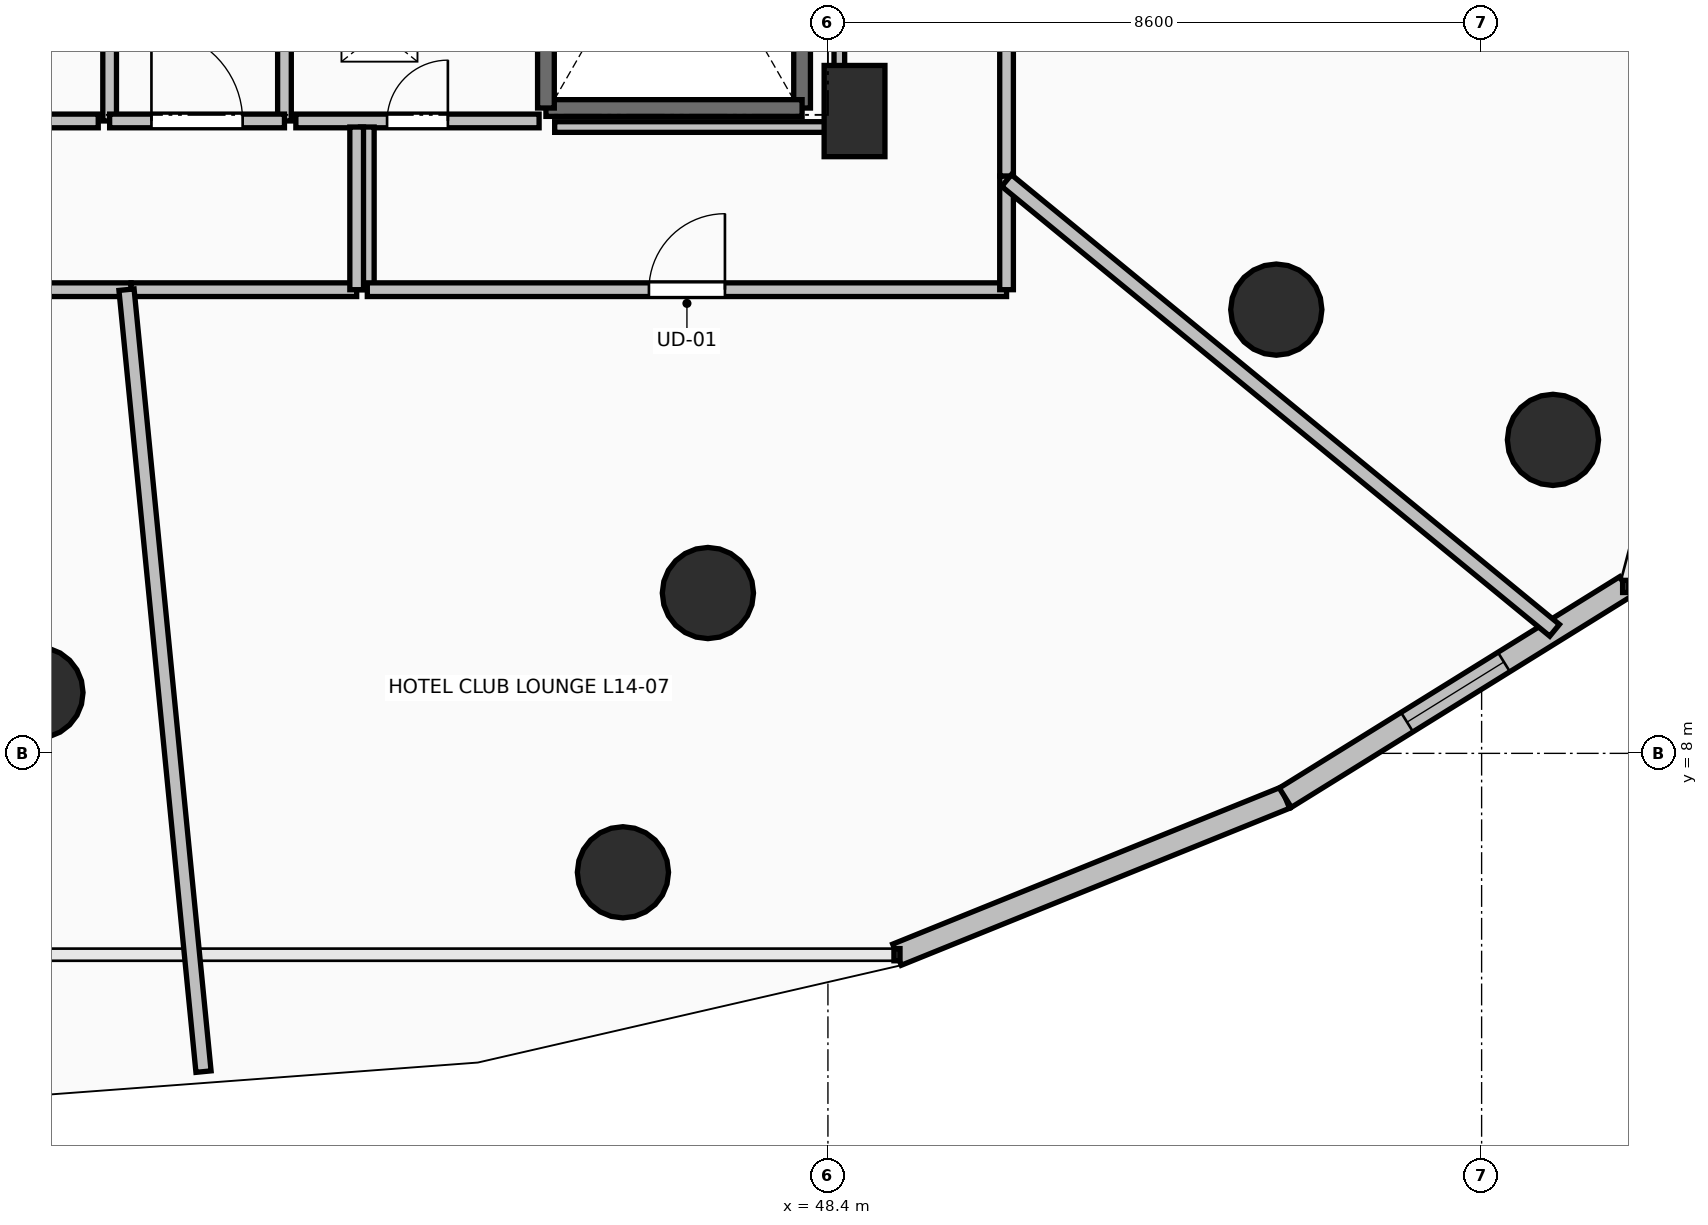
"""IFC4 building model, lengths in metres.
Left out: names, types, materials, properties, quantities, classifications, styles, units other than length and angle.
Written with IfcOpenShell. Run it as: python <this file> out.ifc"""

import sys

from ifc_helpers import new_model, si_unit, direction, frame, frame_2d, origin, origin_2d, place, context, subcontext, project, spatial, rectangle, circle, extrude, element, fill, save


model = new_model("IFC4")
c1 = context("Model", 3, precision=1e-05, world=origin(), true_north=direction((0.0, 1.0)))
c2 = subcontext(c1, "Body", "Model", "MODEL_VIEW")
j1 = project(units=[si_unit("LENGTHUNIT", "METRE"), si_unit("PLANEANGLEUNIT", "RADIAN")], contexts=[c1])
p1 = place(None, origin())
s1 = spatial("IfcSite", under=j1, at=p1, CompositionType="ELEMENT")
p2 = place(p1, origin())
s2 = spatial("IfcBuilding", under=s1, at=p2, CompositionType="ELEMENT")
p3 = place(p2, frame((0.0, 0.0, 55.5)))
s3 = spatial("IfcBuildingStorey", under=s2, at=p3, CompositionType="ELEMENT", Elevation=55.5)
for number, where, z_axis, x_axis in (
    (1, (38.0, 8.8, 0.0), (0.0, 0.0, 1.0), (0.0, -1.0, 0.0)),
    (2, (46.821, 10.109, 0.0), (0.0, 0.0, 1.0), (0.383, -0.924, 0.0)),
    (3, (54.299, 13.838, 0.0), (0.0, 0.0, 1.0), (0.707, -0.707, 0.0)),
    (4, (45.703, 6.435, 0.0), (0.0, 0.0, 1.0), (0.383, -0.924, 0.0)),
    (5, (57.939, 12.124, 0.0), (0.0, 0.0, 1.0), (0.707, -0.707, 0.0)),
):
    element("IfcColumn", number, at=place(p3, frame(where, z_axis=z_axis, x_axis=x_axis)), inside=s3, PredefinedType="COLUMN", context=c2, shape_type="SweptSolid", body=[
        extrude(circle(Radius=0.6, at=origin_2d()), origin(), (0.0, 0.0, 1.0), 3.5),
    ])
p4 = place(p3, frame((48.75, 16.45, 0.0), z_axis=(0.0, 0.0, 1.0), x_axis=(1.0, 0.0, 0.0)))
e6 = element("IfcColumn", 6, at=p4, inside=s3, PredefinedType="PILASTER", context=c2, shape_type="SweptSolid", body=[
    extrude(rectangle(XDim=0.8, YDim=1.2, at=origin_2d()), origin(), (0.0, 0.0, 1.0), 3.5),
])
p5 = place(p3, frame((49.308, 5.351, 0.0), z_axis=(0.0, 0.0, 1.0), x_axis=(0.927095325176, 0.374825636845, 0.0)))
e7 = element("IfcWall", 7, at=p5, inside=s3, PredefinedType="STANDARD", context=c2, shape_type="SweptSolid", body=[
    extrude(rectangle(XDim=5.51, YDim=0.3, at=frame_2d((2.755, 0.0))), origin(), (0.0, 0.0, 1.0), 3.24),
])
p6 = place(p3, frame((54.417, 7.417, 0.0), z_axis=(0.0, 0.0, 1.0), x_axis=(0.849633724826, 0.527373239404, 0.0)))
e8 = element("IfcWall", 8, at=p6, inside=s3, PredefinedType="STANDARD", context=c2, shape_type="SweptSolid", body=[
    extrude(rectangle(XDim=5.271, YDim=0.3, at=frame_2d((2.635, 0.0))), origin(), (0.0, 0.0, 1.0), 3.24),
])
p7 = place(p6, frame((1.885, 0.0, 0.85)))
e9 = element("IfcOpeningElement", 9, at=p7, cuts=e8, PredefinedType="OPENING", context=c2, shape_type="SweptSolid", body=[
    extrude(rectangle(XDim=1.5, YDim=2.19, at=frame_2d((0.75, 1.095))), frame((0.0, 0.165, 0.0), z_axis=(0.0, -1.0, 0.0), x_axis=(1.0, 0.0, 0.0)), (0.0, 0.0, 1.0), 0.33),
])
p8 = place(p3, frame((48.06, 23.91, 0.0), z_axis=(0.0, 0.0, 1.0), x_axis=(0.0, -1.0, 0.0)))
e10 = element("IfcWall", 10, at=p8, inside=s3, PredefinedType="SOLIDWALL", context=c2, shape_type="SweptSolid", body=[
    extrude(rectangle(XDim=7.42, YDim=0.22, at=frame_2d((3.71, 0.0))), origin(), (0.0, 0.0, 1.0), 3.24),
])
p9 = place(p3, frame((48.06, 16.49, 0.0), z_axis=(0.0, 0.0, 1.0), x_axis=(-1.0, 0.0, 0.0)))
e11 = element("IfcWall", 11, at=p9, inside=s3, PredefinedType="SOLIDWALL", context=c2, shape_type="SweptSolid", body=[
    extrude(rectangle(XDim=3.37, YDim=0.22, at=frame_2d((1.685, 0.0))), origin(), (0.0, 0.0, 1.0), 3.24),
])
p10 = place(p3, frame((44.69, 16.49, 0.0), z_axis=(0.0, 0.0, 1.0), x_axis=(0.0, 1.0, 0.0)))
e12 = element("IfcWall", 12, at=p10, inside=s3, PredefinedType="SOLIDWALL", context=c2, shape_type="SweptSolid", body=[
    extrude(rectangle(XDim=7.42, YDim=0.22, at=frame_2d((3.71, 0.0))), origin(), (0.0, 0.0, 1.0), 3.24),
])
p11 = place(p3, frame((41.25, 16.32, 0.0), z_axis=(0.0, 0.0, 1.0), x_axis=(0.0, 1.0, 0.0)))
e13 = element("IfcWall", 13, at=p11, inside=s3, PredefinedType="PARTITIONING", context=c2, shape_type="SweptSolid", body=[
    extrude(rectangle(XDim=7.88, YDim=0.18, at=frame_2d((3.94, 0.0))), origin(), (0.0, 0.0, 1.0), 3.24),
])
p12 = place(p11, frame((3.54, 0.0, 0.0)))
e14 = element("IfcOpeningElement", 14, at=p12, cuts=e13, PredefinedType="OPENING", context=c2, shape_type="SweptSolid", body=[
    extrude(rectangle(XDim=0.8, YDim=2.05, at=frame_2d((0.4, 1.025))), frame((0.0, 0.105, 0.0), z_axis=(0.0, -1.0, 0.0), x_axis=(1.0, 0.0, 0.0)), (0.0, 0.0, 1.0), 0.21),
])
p13 = place(p3, frame((38.95, 21.755, 0.0), z_axis=(0.0, 0.0, 1.0), x_axis=(0.0, -1.0, 0.0)))
e15 = element("IfcWall", 15, at=p13, inside=s3, PredefinedType="PARTITIONING", context=c2, shape_type="SweptSolid", body=[
    extrude(rectangle(XDim=5.435, YDim=0.18, at=frame_2d((2.717, 0.0))), origin(), (0.0, 0.0, 1.0), 3.24),
])
p14 = place(p13, frame((2.292, 0.0, 0.0)))
e16 = element("IfcOpeningElement", 16, at=p14, cuts=e15, PredefinedType="OPENING", context=c2, shape_type="SweptSolid", body=[
    extrude(rectangle(XDim=0.85, YDim=2.1, at=frame_2d((0.425, 1.05))), frame((0.0, 0.105, 0.0), z_axis=(0.0, -1.0, 0.0), x_axis=(1.0, 0.0, 0.0)), (0.0, 0.0, 1.0), 0.21),
])
p15 = place(p3, frame((38.95, 16.32, 0.0), z_axis=(0.0, 0.0, 1.0), x_axis=(1.0, 0.0, 0.0)))
e17 = element("IfcWall", 17, at=p15, inside=s3, PredefinedType="PARTITIONING", context=c2, shape_type="SweptSolid", body=[
    extrude(rectangle(XDim=2.3, YDim=0.18, at=frame_2d((1.15, 0.0))), origin(), (0.0, 0.0, 1.0), 3.24),
])
p16 = place(p15, frame((0.55, 0.0, 0.0)))
e18 = element("IfcOpeningElement", 18, at=p16, cuts=e17, PredefinedType="OPENING", context=c2, shape_type="SweptSolid", body=[
    extrude(rectangle(XDim=1.2, YDim=2.15, at=frame_2d((0.6, 1.075))), frame((0.0, 0.105, 0.0), z_axis=(0.0, -1.0, 0.0), x_axis=(1.0, 0.0, 0.0)), (0.0, 0.0, 1.0), 0.21),
])
p17 = place(p3, frame((41.4, 16.32, 0.0), z_axis=(0.0, 0.0, 1.0), x_axis=(1.0, 0.0, 0.0)))
e19 = element("IfcWall", 19, at=p17, inside=s3, PredefinedType="PARTITIONING", context=c2, shape_type="SweptSolid", body=[
    extrude(rectangle(XDim=3.2, YDim=0.18, at=frame_2d((1.6, 0.0))), origin(), (0.0, 0.0, 1.0), 3.24),
])
p18 = place(p17, frame((1.2, 0.0, 0.0)))
e20 = element("IfcOpeningElement", 20, at=p18, cuts=e19, PredefinedType="OPENING", context=c2, shape_type="SweptSolid", body=[
    extrude(rectangle(XDim=0.8, YDim=2.05, at=frame_2d((0.4, 1.025))), frame((0.0, 0.105, 0.0), z_axis=(0.0, -1.0, 0.0), x_axis=(1.0, 0.0, 0.0)), (0.0, 0.0, 1.0), 0.21),
])
p19 = place(p3, frame((35.2, 16.32, 0.0), z_axis=(0.0, 0.0, 1.0), x_axis=(1.0, 0.0, 0.0)))
e21 = element("IfcWall", 21, at=p19, inside=s3, PredefinedType="PARTITIONING", context=c2, shape_type="SweptSolid", body=[
    extrude(rectangle(XDim=3.6, YDim=0.18, at=frame_2d((1.8, 0.0))), origin(), (0.0, 0.0, 1.0), 3.24),
])
p20 = place(p19, frame((1.375, 0.0, 0.0)))
e22 = element("IfcOpeningElement", 22, at=p20, cuts=e21, PredefinedType="OPENING", context=c2, shape_type="SweptSolid", body=[
    extrude(rectangle(XDim=0.85, YDim=2.1, at=frame_2d((0.425, 1.05))), frame((0.0, 0.105, 0.0), z_axis=(0.0, -1.0, 0.0), x_axis=(1.0, 0.0, 0.0)), (0.0, 0.0, 1.0), 0.21),
])
p21 = place(p3, frame((33.704, 14.1, 0.0), z_axis=(0.0, 0.0, 1.0), x_axis=(1.0, 0.0, 0.0)))
e23 = element("IfcWall", 23, at=p21, inside=s3, PredefinedType="PARTITIONING", context=c2, shape_type="SweptSolid", body=[
    extrude(rectangle(XDim=5.528, YDim=0.18, at=frame_2d((2.764, 0.0))), origin(), (0.0, 0.0, 1.0), 3.24),
])
p22 = place(p21, frame((2.239, 0.0, 0.0)))
e24 = element("IfcOpeningElement", 24, at=p22, cuts=e23, PredefinedType="OPENING", context=c2, shape_type="SweptSolid", body=[
    extrude(rectangle(XDim=1.05, YDim=2.2, at=frame_2d((0.525, 1.1))), frame((0.0, 0.105, 0.0), z_axis=(0.0, -1.0, 0.0), x_axis=(1.0, 0.0, 0.0)), (0.0, 0.0, 1.0), 0.21),
])
p23 = place(p3, frame((42.34, 16.24, 0.0), z_axis=(0.0, 0.0, 1.0), x_axis=(0.0, -1.0, 0.0)))
e25 = element("IfcWall", 25, at=p23, inside=s3, PredefinedType="PARTITIONING", context=c2, shape_type="SweptSolid", body=[
    extrude(rectangle(XDim=2.14, YDim=0.18, at=frame_2d((1.07, 0.0))), origin(), (0.0, 0.0, 1.0), 3.24),
])
p24 = place(p3, frame((42.34, 14.1, 0.0), z_axis=(0.0, 0.0, 1.0), x_axis=(1.0, 0.0, 0.0)))
e26 = element("IfcWall", 26, at=p24, inside=s3, PredefinedType="PARTITIONING", context=c2, shape_type="SweptSolid", body=[
    extrude(rectangle(XDim=8.41, YDim=0.18, at=frame_2d((4.205, 0.0))), origin(), (0.0, 0.0, 1.0), 2.432),
])
p25 = place(p24, frame((3.705, 0.0, 0.0)))
e27 = element("IfcOpeningElement", 27, at=p25, cuts=e26, PredefinedType="OPENING", context=c2, shape_type="SweptSolid", body=[
    extrude(rectangle(XDim=1.0, YDim=2.15, at=frame_2d((0.5, 1.075))), frame((0.0, 0.105, 0.0), z_axis=(0.0, -1.0, 0.0), x_axis=(1.0, 0.0, 0.0)), (0.0, 0.0, 1.0), 0.21),
])
p26 = place(p3, frame((50.75, 14.1, 0.0), z_axis=(0.0, 0.0, 1.0), x_axis=(0.0, 1.0, 0.0)))
e28 = element("IfcWall", 28, at=p26, inside=s3, PredefinedType="PARTITIONING", context=c2, shape_type="SweptSolid", body=[
    extrude(rectangle(XDim=1.496, YDim=0.18, at=frame_2d((0.748, 0.0))), origin(), (0.0, 0.0, 1.0), 2.432),
])
p27 = place(p3, frame((39.232, 14.1, 0.0), z_axis=(0.0, 0.0, 1.0), x_axis=(1.0, 0.0, 0.0)))
e29 = element("IfcWall", 29, at=p27, inside=s3, PredefinedType="PARTITIONING", context=c2, shape_type="SweptSolid", body=[
    extrude(rectangle(XDim=2.968, YDim=0.18, at=frame_2d((1.484, 0.0))), origin(), (0.0, 0.0, 1.0), 3.24),
])
p28 = place(p3, frame((42.2, 14.1, 0.0), z_axis=(0.0, 0.0, 1.0), x_axis=(0.0, 1.0, 0.0)))
e30 = element("IfcWall", 30, at=p28, inside=s3, PredefinedType="PARTITIONING", context=c2, shape_type="SweptSolid", body=[
    extrude(rectangle(XDim=2.14, YDim=0.18, at=frame_2d((1.07, 0.0))), origin(), (0.0, 0.0, 1.0), 3.24),
])
p29 = place(p3, frame((50.75, 15.596, 0.0), z_axis=(0.0, 0.0, 1.0), x_axis=(0.0, 1.0, 0.0)))
e31 = element("IfcWall", 31, at=p29, inside=s3, PredefinedType="PARTITIONING", context=c2, shape_type="SweptSolid", body=[
    extrude(rectangle(XDim=11.46, YDim=0.18, at=frame_2d((5.73, 0.0))), origin(), (0.0, 0.0, 1.0), 2.432),
])
p30 = place(p29, frame((5.23, 0.0, 0.0)))
e32 = element("IfcOpeningElement", 32, at=p30, cuts=e31, PredefinedType="OPENING", context=c2, shape_type="SweptSolid", body=[
    extrude(rectangle(XDim=1.0, YDim=2.15, at=frame_2d((0.5, 1.075))), frame((0.0, 0.105, 0.0), z_axis=(0.0, -1.0, 0.0), x_axis=(1.0, 0.0, 0.0)), (0.0, 0.0, 1.0), 0.21),
])
p31 = place(p3, frame((40.185, 3.813, 0.0), z_axis=(0.0, 0.0, 1.0), x_axis=(-0.097992958783, 0.99518710805, 0.0)))
e33 = element("IfcWall", 33, at=p31, inside=s3, PredefinedType="PARTITIONING", context=c2, shape_type="SweptSolid", body=[
    extrude(rectangle(XDim=10.337, YDim=0.2, at=frame_2d((5.168, 0.0))), origin(), (0.0, 0.0, 1.0), 2.432),
])
p32 = place(p3, frame((57.96, 9.619, 0.0), z_axis=(0.0, 0.0, 1.0), x_axis=(-0.773014125172, 0.634388810025, 0.0)))
e34 = element("IfcWall", 34, at=p32, inside=s3, PredefinedType="PARTITIONING", context=c2, shape_type="SweptSolid", body=[
    extrude(rectangle(XDim=9.327, YDim=0.2, at=frame_2d((4.664, 0.0))), origin(), (0.0, 0.0, 1.0), 2.432),
])
p33 = place(p3, frame((48.55, 23.754, 0.0), z_axis=(0.0, 0.0, 1.0), x_axis=(0.0, -1.0, 0.0)))
e35 = element("IfcWall", 35, at=p33, inside=s3, PredefinedType="PARTITIONING", context=c2, shape_type="SweptSolid", body=[
    extrude(rectangle(XDim=7.514, YDim=0.14, at=frame_2d((3.757, 0.0))), origin(), (0.0, 0.0, 1.0), 2.432),
])
p34 = place(p3, frame((48.55, 16.24, 0.0), z_axis=(0.0, 0.0, 1.0), x_axis=(-1.0, 0.0, 0.0)))
e36 = element("IfcWall", 36, at=p34, inside=s3, PredefinedType="PARTITIONING", context=c2, shape_type="SweptSolid", body=[
    extrude(rectangle(XDim=3.745, YDim=0.14, at=frame_2d((1.873, 0.0))), origin(), (0.0, 0.0, 1.0), 2.432),
])
p35 = place(p7, origin())
e37 = element("IfcWindow", 37, at=p35, inside=s3, PartitioningType="SINGLE_PANEL", PredefinedType="WINDOW", context=c2, shape_type="SweptSolid", body=[
    extrude(rectangle(XDim=1.5, YDim=2.19, at=frame_2d((0.75, 1.095))), frame((0.0, 0.03, 0.0), z_axis=(0.0, -1.0, 0.0), x_axis=(1.0, 0.0, 0.0)), (0.0, 0.0, 1.0), 0.06),
])
fill(e9, e37)
p36 = place(p16, origin())
e38 = element("IfcDoor", 38, at=p36, inside=s3, OperationType="SINGLE_SWING_LEFT", PredefinedType="DOOR", context=c2, shape_type="SweptSolid", body=[
    extrude(rectangle(XDim=1.2, YDim=2.15, at=frame_2d((0.6, 1.075))), frame((0.0, 0.025, 0.0), z_axis=(0.0, -1.0, 0.0), x_axis=(1.0, 0.0, 0.0)), (0.0, 0.0, 1.0), 0.05),
])
fill(e18, e38)
p37 = place(p18, origin())
e39 = element("IfcDoor", 39, at=p37, inside=s3, OperationType="SINGLE_SWING_RIGHT", PredefinedType="DOOR", context=c2, shape_type="SweptSolid", body=[
    extrude(rectangle(XDim=0.8, YDim=2.05, at=frame_2d((0.4, 1.025))), frame((0.0, 0.025, 0.0), z_axis=(0.0, -1.0, 0.0), x_axis=(1.0, 0.0, 0.0)), (0.0, 0.0, 1.0), 0.05),
])
fill(e20, e39)
p38 = place(p25, origin())
e40 = element("IfcDoor", 40, at=p38, inside=s3, OperationType="SINGLE_SWING_RIGHT", PredefinedType="DOOR", context=c2, shape_type="SweptSolid", body=[
    extrude(rectangle(XDim=1.0, YDim=2.15, at=frame_2d((0.5, 1.075))), frame((0.0, 0.025, 0.0), z_axis=(0.0, -1.0, 0.0), x_axis=(1.0, 0.0, 0.0)), (0.0, 0.0, 1.0), 0.05),
])
fill(e27, e40)
save(model, sys.argv[1])
